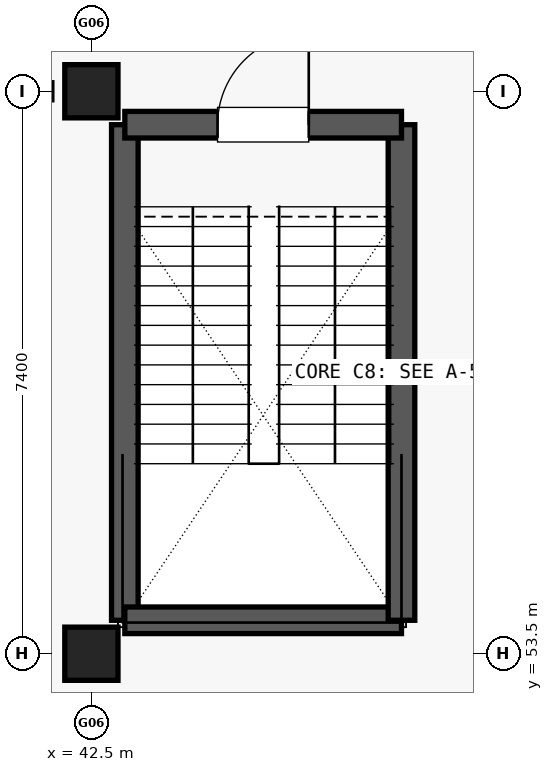
"""IFC4 building model, lengths in metres.
Left out: names, types, materials, properties, quantities, classifications, styles, units other than length and angle.
Written with IfcOpenShell. Run it as: python <this file> out.ifc"""

import sys

from ifc_helpers import new_model, si_unit, direction, frame, frame_2d, origin, origin_2d, place, context, subcontext, project, spatial, rectangle, extrude, element, fill, save


model = new_model("IFC4")
c1 = context("Model", 3, precision=1e-05, world=origin(), true_north=direction((0.0, 1.0)))
c2 = subcontext(c1, "Body", "Model", "MODEL_VIEW")
j1 = project(units=[si_unit("LENGTHUNIT", "METRE"), si_unit("PLANEANGLEUNIT", "RADIAN")], contexts=[c1])
p1 = place(None, origin())
s1 = spatial("IfcSite", under=j1, at=p1, CompositionType="ELEMENT")
p2 = place(p1, origin())
s2 = spatial("IfcBuilding", under=s1, at=p2, CompositionType="ELEMENT")
p3 = place(p2, frame((0.0, 0.0, 5.4)))
s3 = spatial("IfcBuildingStorey", under=s2, at=p3, CompositionType="ELEMENT", Elevation=5.4)
for number, where, z_axis, x_axis in (
    (1, (42.5, 53.5, 0.0), (0.0, 0.0, 1.0), (1.0, 0.0, 0.0)),
    (2, (42.5, 60.9, 0.0), (0.0, 0.0, 1.0), (1.0, 0.0, 0.0)),
):
    element("IfcColumn", number, at=place(p3, frame(where, z_axis=z_axis, x_axis=x_axis)), inside=s3, PredefinedType="COLUMN", context=c2, shape_type="SweptSolid", body=[
        extrude(rectangle(XDim=0.7, YDim=0.7, at=origin_2d()), origin(), (0.0, 0.0, 1.0), 4.56),
    ])
p4 = place(p3, frame((42.94, 53.94, 0.0), z_axis=(0.0, 0.0, 1.0), x_axis=(0.0, 1.0, 0.0)))
e3 = element("IfcWall", 3, at=p4, inside=s3, PredefinedType="SHEAR", context=c2, shape_type="SweptSolid", body=[
    extrude(rectangle(XDim=6.52, YDim=0.35, at=frame_2d((3.26, 0.0))), origin(), (0.0, 0.0, 1.0), 4.555),
])
p5 = place(p3, frame((42.94, 53.94, 0.0), z_axis=(0.0, 0.0, 1.0), x_axis=(1.0, 0.0, 0.0)))
e4 = element("IfcWall", 4, at=p5, inside=s3, PredefinedType="SHEAR", context=c2, shape_type="SweptSolid", body=[
    extrude(rectangle(XDim=3.64, YDim=0.35, at=frame_2d((1.82, 0.0))), origin(), (0.0, 0.0, 1.0), 4.555),
])
p6 = place(p3, frame((46.58, 53.94, 0.0), z_axis=(0.0, 0.0, 1.0), x_axis=(0.0, 1.0, 0.0)))
e5 = element("IfcWall", 5, at=p6, inside=s3, PredefinedType="SHEAR", context=c2, shape_type="SweptSolid", body=[
    extrude(rectangle(XDim=6.52, YDim=0.35, at=frame_2d((3.26, 0.0))), origin(), (0.0, 0.0, 1.0), 4.555),
])
p7 = place(p3, frame((42.94, 60.46, 0.0), z_axis=(0.0, 0.0, 1.0), x_axis=(1.0, 0.0, 0.0)))
e6 = element("IfcWall", 6, at=p7, inside=s3, PredefinedType="SHEAR", context=c2, shape_type="SweptSolid", body=[
    extrude(rectangle(XDim=3.64, YDim=0.35, at=frame_2d((1.82, 0.0))), origin(), (0.0, 0.0, 1.0), 4.555),
])
p8 = place(p7, frame((1.22, 0.0, 0.0)))
e7 = element("IfcOpeningElement", 7, at=p8, cuts=e6, PredefinedType="OPENING", context=c2, shape_type="SweptSolid", body=[
    extrude(rectangle(XDim=1.2, YDim=2.15, at=frame_2d((0.6, 1.075))), frame((0.0, 0.185, 0.0), z_axis=(0.0, -1.0, 0.0), x_axis=(1.0, 0.0, 0.0)), (0.0, 0.0, 1.0), 0.37),
])
p9 = place(p8, origin())
e8 = element("IfcDoor", 8, at=p9, inside=s3, OperationType="SINGLE_SWING_RIGHT", PredefinedType="DOOR", context=c2, shape_type="SweptSolid", body=[
    extrude(rectangle(XDim=1.2, YDim=2.15, at=frame_2d((0.6, 1.075))), frame((0.0, 0.025, 0.0), z_axis=(0.0, -1.0, 0.0), x_axis=(1.0, 0.0, 0.0)), (0.0, 0.0, 1.0), 0.05),
])
fill(e7, e8)
save(model, sys.argv[1])
